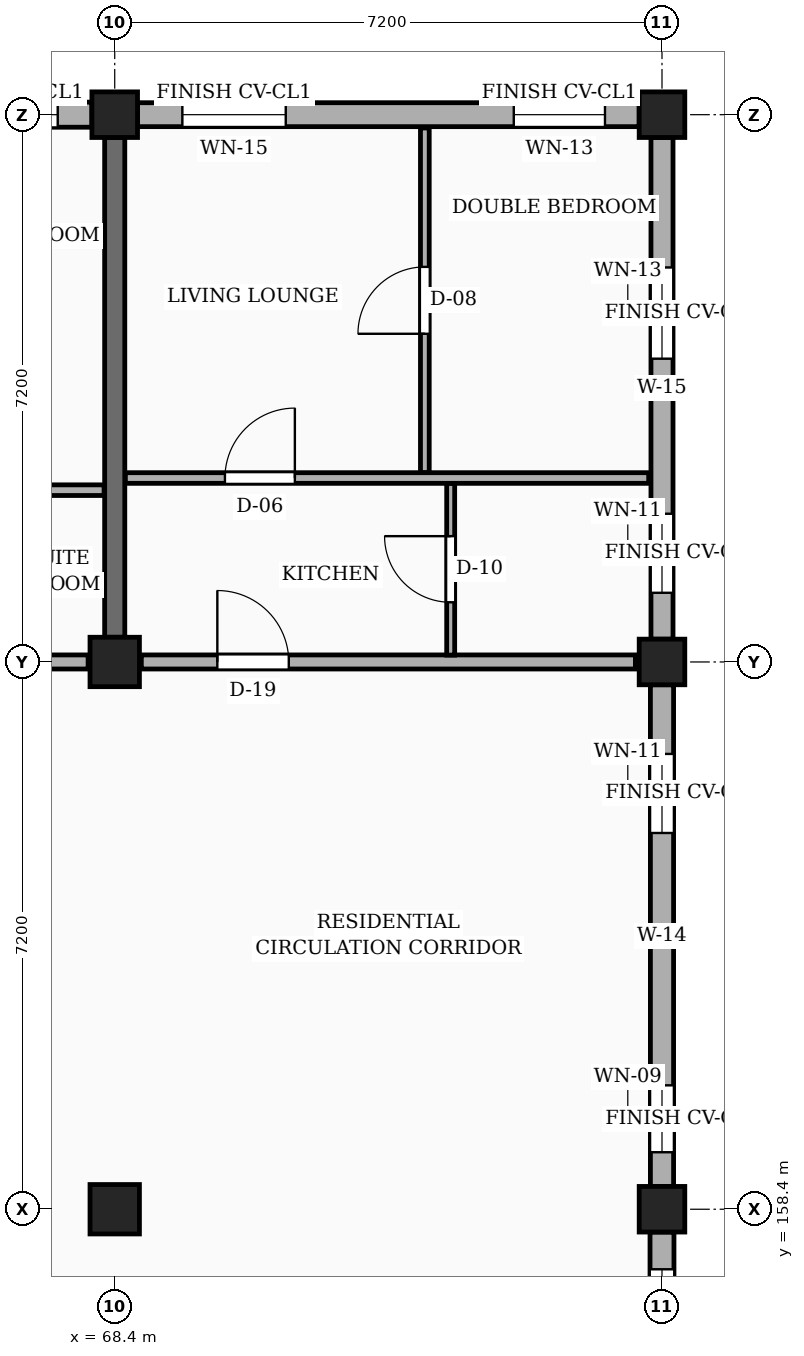
"""IFC4 building model, lengths in metres.
Left out: names, types, materials, properties, quantities, classifications, styles, units other than length and angle.
Written with IfcOpenShell. Run it as: python <this file> out.ifc"""

import sys

from ifc_helpers import new_model, si_unit, direction, frame, frame_2d, origin, origin_2d, place, context, subcontext, project, spatial, rectangle, extrude, element, fill, save


model = new_model("IFC4")
c1 = context("Model", 3, precision=1e-05, world=origin(), true_north=direction((0.0, 1.0)))
c2 = subcontext(c1, "Body", "Model", "MODEL_VIEW")
j1 = project(units=[si_unit("LENGTHUNIT", "METRE"), si_unit("PLANEANGLEUNIT", "RADIAN")], contexts=[c1])
p1 = place(None, origin())
s1 = spatial("IfcSite", under=j1, at=p1, CompositionType="ELEMENT")
p2 = place(p1, origin())
s2 = spatial("IfcBuilding", under=s1, at=p2, CompositionType="ELEMENT")
p3 = place(p2, origin())
s3 = spatial("IfcBuildingStorey", under=s2, at=p3, CompositionType="ELEMENT", Elevation=0.0)
for number, where, z_axis, x_axis in (
    (1, (68.4, 158.4, 0.0), (0.0, 0.0, 1.0), (1.0, 0.0, 0.0)),
    (2, (68.4, 165.6, 0.0), (0.0, 0.0, 1.0), (1.0, 0.0, 0.0)),
):
    element("IfcColumn", number, at=place(p3, frame(where, z_axis=z_axis, x_axis=x_axis)), inside=s3, PredefinedType="COLUMN", context=c2, shape_type="SweptSolid", body=[
        extrude(rectangle(XDim=0.65, YDim=0.65, at=origin_2d()), origin(), (0.0, 0.0, 1.0), 4.5),
    ])
for number, where, z_axis, x_axis in (
    (3, (68.4, 172.8, 0.0), (0.0, 0.0, 1.0), (1.0, 0.0, 0.0)),
    (4, (75.6, 158.4, 0.0), (0.0, 0.0, 1.0), (1.0, 0.0, 0.0)),
    (5, (75.6, 165.6, 0.0), (0.0, 0.0, 1.0), (1.0, 0.0, 0.0)),
    (6, (75.6, 172.8, 0.0), (0.0, 0.0, 1.0), (1.0, 0.0, 0.0)),
):
    element("IfcColumn", number, at=place(p3, frame(where, z_axis=z_axis, x_axis=x_axis)), inside=s3, PredefinedType="COLUMN", context=c2, shape_type="SweptSolid", body=[
        extrude(rectangle(XDim=0.6, YDim=0.6, at=origin_2d()), origin(), (0.0, 0.0, 1.0), 4.5),
    ])
p4 = place(p3, frame((68.4, 165.925, 0.0), z_axis=(0.0, 0.0, 1.0), x_axis=(0.0, 1.0, 0.0)))
e7 = element("IfcWall", 7, at=p4, inside=s3, PredefinedType="SOLIDWALL", context=c2, shape_type="SweptSolid", body=[
    extrude(rectangle(XDim=6.575, YDim=0.265, at=frame_2d((3.288, 0.0))), origin(), (0.0, 0.0, 1.0), 3.535),
])
p5 = place(p3, frame((75.6, 151.46, 0.0), z_axis=(0.0, 0.0, 1.0), x_axis=(0.0, 1.0, 0.0)))
e8 = element("IfcWall", 8, at=p5, inside=s3, PredefinedType="SOLIDWALL", context=c2, shape_type="SweptSolid", body=[
    extrude(rectangle(XDim=6.64, YDim=0.315, at=frame_2d((3.32, 0.0))), origin(), (0.0, 0.0, 1.0), 3.805),
])
p6 = place(p5, frame((0.41, 0.0, 0.78)))
e9 = element("IfcOpeningElement", 9, at=p6, cuts=e8, PredefinedType="OPENING", context=c2, shape_type="SweptSolid", body=[
    extrude(rectangle(XDim=0.88, YDim=1.26, at=frame_2d((0.44, 0.63))), frame((0.0, 0.167, 0.0), z_axis=(0.0, -1.0, 0.0), x_axis=(1.0, 0.0, 0.0)), (0.0, 0.0, 1.0), 0.335),
])
p7 = place(p5, frame((2.5, 0.0, 0.78)))
e10 = element("IfcOpeningElement", 10, at=p7, cuts=e8, PredefinedType="OPENING", context=c2, shape_type="SweptSolid", body=[
    extrude(rectangle(XDim=1.4, YDim=1.15, at=frame_2d((0.7, 0.575))), frame((0.0, 0.167, 0.0), z_axis=(0.0, -1.0, 0.0), x_axis=(1.0, 0.0, 0.0)), (0.0, 0.0, 1.0), 0.335),
])
p8 = place(p5, frame((5.19, 0.0, 0.78)))
e11 = element("IfcOpeningElement", 11, at=p8, cuts=e8, PredefinedType="OPENING", context=c2, shape_type="SweptSolid", body=[
    extrude(rectangle(XDim=0.96, YDim=1.26, at=frame_2d((0.48, 0.63))), frame((0.0, 0.167, 0.0), z_axis=(0.0, -1.0, 0.0), x_axis=(1.0, 0.0, 0.0)), (0.0, 0.0, 1.0), 0.335),
])
p9 = place(p3, frame((75.6, 158.7, 0.0), z_axis=(0.0, 0.0, 1.0), x_axis=(0.0, 1.0, 0.0)))
e12 = element("IfcWall", 12, at=p9, inside=s3, PredefinedType="SOLIDWALL", context=c2, shape_type="SweptSolid", body=[
    extrude(rectangle(XDim=6.6, YDim=0.305, at=frame_2d((3.3, 0.0))), origin(), (0.0, 0.0, 1.0), 3.805),
])
p10 = place(p9, frame((0.45, 0.0, 0.78)))
e13 = element("IfcOpeningElement", 13, at=p10, cuts=e12, PredefinedType="OPENING", context=c2, shape_type="SweptSolid", body=[
    extrude(rectangle(XDim=0.88, YDim=1.26, at=frame_2d((0.44, 0.63))), frame((0.0, 0.163, 0.0), z_axis=(0.0, -1.0, 0.0), x_axis=(1.0, 0.0, 0.0)), (0.0, 0.0, 1.0), 0.325),
])
p11 = place(p9, frame((4.65, 0.0, 0.78)))
e14 = element("IfcOpeningElement", 14, at=p11, cuts=e12, PredefinedType="OPENING", context=c2, shape_type="SweptSolid", body=[
    extrude(rectangle(XDim=1.04, YDim=1.26, at=frame_2d((0.52, 0.63))), frame((0.0, 0.163, 0.0), z_axis=(0.0, -1.0, 0.0), x_axis=(1.0, 0.0, 0.0)), (0.0, 0.0, 1.0), 0.325),
])
p12 = place(p3, frame((75.6, 165.9, 0.0), z_axis=(0.0, 0.0, 1.0), x_axis=(0.0, 1.0, 0.0)))
e15 = element("IfcWall", 15, at=p12, inside=s3, PredefinedType="SOLIDWALL", context=c2, shape_type="SweptSolid", body=[
    extrude(rectangle(XDim=6.6, YDim=0.29, at=frame_2d((3.3, 0.0))), origin(), (0.0, 0.0, 1.0), 3.805),
])
p13 = place(p12, frame((0.61, 0.0, 0.78)))
e16 = element("IfcOpeningElement", 16, at=p13, cuts=e15, PredefinedType="OPENING", context=c2, shape_type="SweptSolid", body=[
    extrude(rectangle(XDim=1.04, YDim=1.26, at=frame_2d((0.52, 0.63))), frame((0.0, 0.155, 0.0), z_axis=(0.0, -1.0, 0.0), x_axis=(1.0, 0.0, 0.0)), (0.0, 0.0, 1.0), 0.31),
])
p14 = place(p12, frame((3.69, 0.0, 0.78)))
e17 = element("IfcOpeningElement", 17, at=p14, cuts=e15, PredefinedType="OPENING", context=c2, shape_type="SweptSolid", body=[
    extrude(rectangle(XDim=1.2, YDim=1.26, at=frame_2d((0.6, 0.63))), frame((0.0, 0.155, 0.0), z_axis=(0.0, -1.0, 0.0), x_axis=(1.0, 0.0, 0.0)), (0.0, 0.0, 1.0), 0.31),
])
p15 = place(p3, frame((75.3, 172.8, 0.0), z_axis=(0.0, 0.0, 1.0), x_axis=(-1.0, 0.0, 0.0)))
e18 = element("IfcWall", 18, at=p15, inside=s3, PredefinedType="SOLIDWALL", context=c2, shape_type="SweptSolid", body=[
    extrude(rectangle(XDim=6.6, YDim=0.315, at=frame_2d((3.3, 0.0))), origin(), (0.0, 0.0, 1.0), 3.805),
])
p16 = place(p15, frame((0.45, 0.0, 0.78)))
e19 = element("IfcOpeningElement", 19, at=p16, cuts=e18, PredefinedType="OPENING", context=c2, shape_type="SweptSolid", body=[
    extrude(rectangle(XDim=1.2, YDim=1.26, at=frame_2d((0.6, 0.63))), frame((0.0, 0.167, 0.0), z_axis=(0.0, -1.0, 0.0), x_axis=(1.0, 0.0, 0.0)), (0.0, 0.0, 1.0), 0.335),
])
p17 = place(p15, frame((4.65, 0.0, 0.78)))
e20 = element("IfcOpeningElement", 20, at=p17, cuts=e18, PredefinedType="OPENING", context=c2, shape_type="SweptSolid", body=[
    extrude(rectangle(XDim=1.36, YDim=1.26, at=frame_2d((0.68, 0.63))), frame((0.0, 0.167, 0.0), z_axis=(0.0, -1.0, 0.0), x_axis=(1.0, 0.0, 0.0)), (0.0, 0.0, 1.0), 0.335),
])
p18 = place(p3, frame((68.1, 172.8, 0.0), z_axis=(0.0, 0.0, 1.0), x_axis=(-1.0, 0.0, 0.0)))
e21 = element("IfcWall", 21, at=p18, inside=s3, PredefinedType="SOLIDWALL", context=c2, shape_type="SweptSolid", body=[
    extrude(rectangle(XDim=6.6, YDim=0.33, at=frame_2d((3.3, 0.0))), origin(), (0.0, 0.0, 1.0), 3.805),
])
p19 = place(p18, frame((0.45, 0.0, 0.78)))
e22 = element("IfcOpeningElement", 22, at=p19, cuts=e21, PredefinedType="OPENING", context=c2, shape_type="SweptSolid", body=[
    extrude(rectangle(XDim=1.36, YDim=1.26, at=frame_2d((0.68, 0.63))), frame((0.0, 0.175, 0.0), z_axis=(0.0, -1.0, 0.0), x_axis=(1.0, 0.0, 0.0)), (0.0, 0.0, 1.0), 0.35),
])
p20 = place(p18, frame((4.65, 0.0, 0.78)))
e23 = element("IfcOpeningElement", 23, at=p20, cuts=e21, PredefinedType="OPENING", context=c2, shape_type="SweptSolid", body=[
    extrude(rectangle(XDim=0.9, YDim=1.36, at=frame_2d((0.45, 0.68))), frame((0.0, 0.175, 0.0), z_axis=(0.0, -1.0, 0.0), x_axis=(1.0, 0.0, 0.0)), (0.0, 0.0, 1.0), 0.35),
])
p21 = place(p3, frame((61.55, 165.6, 0.0), z_axis=(0.0, 0.0, 1.0), x_axis=(1.0, 0.0, 0.0)))
e24 = element("IfcWall", 24, at=p21, inside=s3, PredefinedType="PARTITIONING", context=c2, shape_type="SweptSolid", body=[
    extrude(rectangle(XDim=6.5, YDim=0.185, at=frame_2d((3.25, 0.0))), origin(), (0.0, 0.0, 1.0), 3.435),
])
p22 = place(p21, frame((1.0, 0.0, 0.0)))
e25 = element("IfcOpeningElement", 25, at=p22, cuts=e24, PredefinedType="OPENING", context=c2, shape_type="SweptSolid", body=[
    extrude(rectangle(XDim=1.0, YDim=2.15, at=frame_2d((0.5, 1.075))), frame((0.0, 0.103, 0.0), z_axis=(0.0, -1.0, 0.0), x_axis=(1.0, 0.0, 0.0)), (0.0, 0.0, 1.0), 0.205),
])
p23 = place(p3, frame((68.75, 165.6, 0.0), z_axis=(0.0, 0.0, 1.0), x_axis=(1.0, 0.0, 0.0)))
e26 = element("IfcWall", 26, at=p23, inside=s3, PredefinedType="PARTITIONING", context=c2, shape_type="SweptSolid", body=[
    extrude(rectangle(XDim=6.5, YDim=0.185, at=frame_2d((3.25, 0.0))), origin(), (0.0, 0.0, 1.0), 3.435),
])
p24 = place(p23, frame((1.0, 0.0, 0.0)))
e27 = element("IfcOpeningElement", 27, at=p24, cuts=e26, PredefinedType="OPENING", context=c2, shape_type="SweptSolid", body=[
    extrude(rectangle(XDim=0.94, YDim=2.12, at=frame_2d((0.47, 1.06))), frame((0.0, 0.103, 0.0), z_axis=(0.0, -1.0, 0.0), x_axis=(1.0, 0.0, 0.0)), (0.0, 0.0, 1.0), 0.205),
])
p25 = place(p3, frame((61.34, 167.86, 0.0), z_axis=(0.0, 0.0, 1.0), x_axis=(1.0, 0.0, 0.0)))
e28 = element("IfcWall", 28, at=p25, inside=s3, PredefinedType="PARTITIONING", context=c2, shape_type="SweptSolid", body=[
    extrude(rectangle(XDim=6.92, YDim=0.14, at=frame_2d((3.46, 0.0))), origin(), (0.0, 0.0, 1.0), 3.67),
])
p26 = place(p25, frame((1.31, 0.0, 0.0)))
e29 = element("IfcOpeningElement", 29, at=p26, cuts=e28, PredefinedType="OPENING", context=c2, shape_type="SweptSolid", body=[
    extrude(rectangle(XDim=0.95, YDim=2.1, at=frame_2d((0.475, 1.05))), frame((0.0, 0.08, 0.0), z_axis=(0.0, -1.0, 0.0), x_axis=(1.0, 0.0, 0.0)), (0.0, 0.0, 1.0), 0.16),
])
p27 = place(p3, frame((72.48, 168.09, 0.0), z_axis=(0.0, 0.0, 1.0), x_axis=(0.0, 1.0, 0.0)))
e30 = element("IfcWall", 30, at=p27, inside=s3, PredefinedType="PARTITIONING", context=c2, shape_type="SweptSolid", body=[
    extrude(rectangle(XDim=4.535, YDim=0.115, at=frame_2d((2.268, 0.0))), origin(), (0.0, 0.0, 1.0), 3.67),
])
p28 = place(p27, frame((1.827, 0.0, 0.0)))
e31 = element("IfcOpeningElement", 31, at=p28, cuts=e30, PredefinedType="OPENING", context=c2, shape_type="SweptSolid", body=[
    extrude(rectangle(XDim=0.88, YDim=2.08, at=frame_2d((0.44, 1.04))), frame((0.0, 0.067, 0.0), z_axis=(0.0, -1.0, 0.0), x_axis=(1.0, 0.0, 0.0)), (0.0, 0.0, 1.0), 0.135),
])
p29 = place(p3, frame((72.82, 165.69, 0.0), z_axis=(0.0, 0.0, 1.0), x_axis=(0.0, 1.0, 0.0)))
e32 = element("IfcWall", 32, at=p29, inside=s3, PredefinedType="PARTITIONING", context=c2, shape_type="SweptSolid", body=[
    extrude(rectangle(XDim=2.26, YDim=0.105, at=frame_2d((1.13, 0.0))), origin(), (0.0, 0.0, 1.0), 3.67),
])
p30 = place(p29, frame((0.695, 0.0, 0.0)))
e33 = element("IfcOpeningElement", 33, at=p30, cuts=e32, PredefinedType="OPENING", context=c2, shape_type="SweptSolid", body=[
    extrude(rectangle(XDim=0.87, YDim=2.05, at=frame_2d((0.435, 1.025))), frame((0.0, 0.062, 0.0), z_axis=(0.0, -1.0, 0.0), x_axis=(1.0, 0.0, 0.0)), (0.0, 0.0, 1.0), 0.125),
])
p31 = place(p3, frame((68.54, 168.02, 0.0), z_axis=(0.0, 0.0, 1.0), x_axis=(1.0, 0.0, 0.0)))
e34 = element("IfcWall", 34, at=p31, inside=s3, PredefinedType="PARTITIONING", context=c2, shape_type="SweptSolid", body=[
    extrude(rectangle(XDim=6.885, YDim=0.14, at=frame_2d((3.442, 0.0))), origin(), (0.0, 0.0, 1.0), 3.67),
])
p32 = place(p31, frame((1.31, 0.0, 0.0)))
e35 = element("IfcOpeningElement", 35, at=p32, cuts=e34, PredefinedType="OPENING", context=c2, shape_type="SweptSolid", body=[
    extrude(rectangle(XDim=0.92, YDim=2.1, at=frame_2d((0.46, 1.05))), frame((0.0, 0.08, 0.0), z_axis=(0.0, -1.0, 0.0), x_axis=(1.0, 0.0, 0.0)), (0.0, 0.0, 1.0), 0.16),
])
p33 = place(p8, origin())
e36 = element("IfcWindow", 36, at=p33, inside=s3, PartitioningType="SINGLE_PANEL", PredefinedType="WINDOW", context=c2, shape_type="SweptSolid", body=[
    extrude(rectangle(XDim=0.96, YDim=1.26, at=frame_2d((0.48, 0.63))), frame((0.0, 0.03, 0.0), z_axis=(0.0, -1.0, 0.0), x_axis=(1.0, 0.0, 0.0)), (0.0, 0.0, 1.0), 0.06),
])
fill(e11, e36)
p34 = place(p10, origin())
e37 = element("IfcWindow", 37, at=p34, inside=s3, PartitioningType="SINGLE_PANEL", PredefinedType="WINDOW", context=c2, shape_type="SweptSolid", body=[
    extrude(rectangle(XDim=0.88, YDim=1.26, at=frame_2d((0.44, 0.63))), frame((0.0, 0.03, 0.0), z_axis=(0.0, -1.0, 0.0), x_axis=(1.0, 0.0, 0.0)), (0.0, 0.0, 1.0), 0.06),
])
fill(e13, e37)
p35 = place(p11, origin())
e38 = element("IfcWindow", 38, at=p35, inside=s3, PartitioningType="SINGLE_PANEL", PredefinedType="WINDOW", context=c2, shape_type="SweptSolid", body=[
    extrude(rectangle(XDim=1.04, YDim=1.26, at=frame_2d((0.52, 0.63))), frame((0.0, 0.03, 0.0), z_axis=(0.0, -1.0, 0.0), x_axis=(1.0, 0.0, 0.0)), (0.0, 0.0, 1.0), 0.06),
])
fill(e14, e38)
p36 = place(p13, origin())
e39 = element("IfcWindow", 39, at=p36, inside=s3, PartitioningType="SINGLE_PANEL", PredefinedType="WINDOW", context=c2, shape_type="SweptSolid", body=[
    extrude(rectangle(XDim=1.04, YDim=1.26, at=frame_2d((0.52, 0.63))), frame((0.0, 0.03, 0.0), z_axis=(0.0, -1.0, 0.0), x_axis=(1.0, 0.0, 0.0)), (0.0, 0.0, 1.0), 0.06),
])
fill(e16, e39)
p37 = place(p14, origin())
e40 = element("IfcWindow", 40, at=p37, inside=s3, PartitioningType="SINGLE_PANEL", PredefinedType="WINDOW", context=c2, shape_type="SweptSolid", body=[
    extrude(rectangle(XDim=1.2, YDim=1.26, at=frame_2d((0.6, 0.63))), frame((0.0, 0.03, 0.0), z_axis=(0.0, -1.0, 0.0), x_axis=(1.0, 0.0, 0.0)), (0.0, 0.0, 1.0), 0.06),
])
fill(e17, e40)
p38 = place(p16, origin())
e41 = element("IfcWindow", 41, at=p38, inside=s3, PartitioningType="SINGLE_PANEL", PredefinedType="WINDOW", context=c2, shape_type="SweptSolid", body=[
    extrude(rectangle(XDim=1.2, YDim=1.26, at=frame_2d((0.6, 0.63))), frame((0.0, 0.03, 0.0), z_axis=(0.0, -1.0, 0.0), x_axis=(1.0, 0.0, 0.0)), (0.0, 0.0, 1.0), 0.06),
])
fill(e19, e41)
p39 = place(p17, origin())
e42 = element("IfcWindow", 42, at=p39, inside=s3, PartitioningType="SINGLE_PANEL", PredefinedType="WINDOW", context=c2, shape_type="SweptSolid", body=[
    extrude(rectangle(XDim=1.36, YDim=1.26, at=frame_2d((0.68, 0.63))), frame((0.0, 0.03, 0.0), z_axis=(0.0, -1.0, 0.0), x_axis=(1.0, 0.0, 0.0)), (0.0, 0.0, 1.0), 0.06),
])
fill(e20, e42)
p40 = place(p19, origin())
e43 = element("IfcWindow", 43, at=p40, inside=s3, PartitioningType="SINGLE_PANEL", PredefinedType="WINDOW", context=c2, shape_type="SweptSolid", body=[
    extrude(rectangle(XDim=1.36, YDim=1.26, at=frame_2d((0.68, 0.63))), frame((0.0, 0.03, 0.0), z_axis=(0.0, -1.0, 0.0), x_axis=(1.0, 0.0, 0.0)), (0.0, 0.0, 1.0), 0.06),
])
fill(e22, e43)
p41 = place(p24, origin())
e44 = element("IfcDoor", 44, at=p41, inside=s3, OperationType="SINGLE_SWING_LEFT", PredefinedType="DOOR", context=c2, shape_type="SweptSolid", body=[
    extrude(rectangle(XDim=0.94, YDim=2.12, at=frame_2d((0.47, 1.06))), frame((0.0, 0.025, 0.0), z_axis=(0.0, -1.0, 0.0), x_axis=(1.0, 0.0, 0.0)), (0.0, 0.0, 1.0), 0.05),
])
fill(e27, e44)
p42 = place(p28, origin())
e45 = element("IfcDoor", 45, at=p42, inside=s3, OperationType="SINGLE_SWING_LEFT", PredefinedType="DOOR", context=c2, shape_type="SweptSolid", body=[
    extrude(rectangle(XDim=0.88, YDim=2.08, at=frame_2d((0.44, 1.04))), frame((0.0, 0.025, 0.0), z_axis=(0.0, -1.0, 0.0), x_axis=(1.0, 0.0, 0.0)), (0.0, 0.0, 1.0), 0.05),
])
fill(e31, e45)
p43 = place(p30, origin())
e46 = element("IfcDoor", 46, at=p43, inside=s3, OperationType="SINGLE_SWING_RIGHT", PredefinedType="DOOR", context=c2, shape_type="SweptSolid", body=[
    extrude(rectangle(XDim=0.87, YDim=2.05, at=frame_2d((0.435, 1.025))), frame((0.0, 0.025, 0.0), z_axis=(0.0, -1.0, 0.0), x_axis=(1.0, 0.0, 0.0)), (0.0, 0.0, 1.0), 0.05),
])
fill(e33, e46)
p44 = place(p32, origin())
e47 = element("IfcDoor", 47, at=p44, inside=s3, OperationType="SINGLE_SWING_RIGHT", PredefinedType="DOOR", context=c2, shape_type="SweptSolid", body=[
    extrude(rectangle(XDim=0.92, YDim=2.1, at=frame_2d((0.46, 1.05))), frame((0.0, 0.025, 0.0), z_axis=(0.0, -1.0, 0.0), x_axis=(1.0, 0.0, 0.0)), (0.0, 0.0, 1.0), 0.05),
])
fill(e35, e47)
save(model, sys.argv[1])
